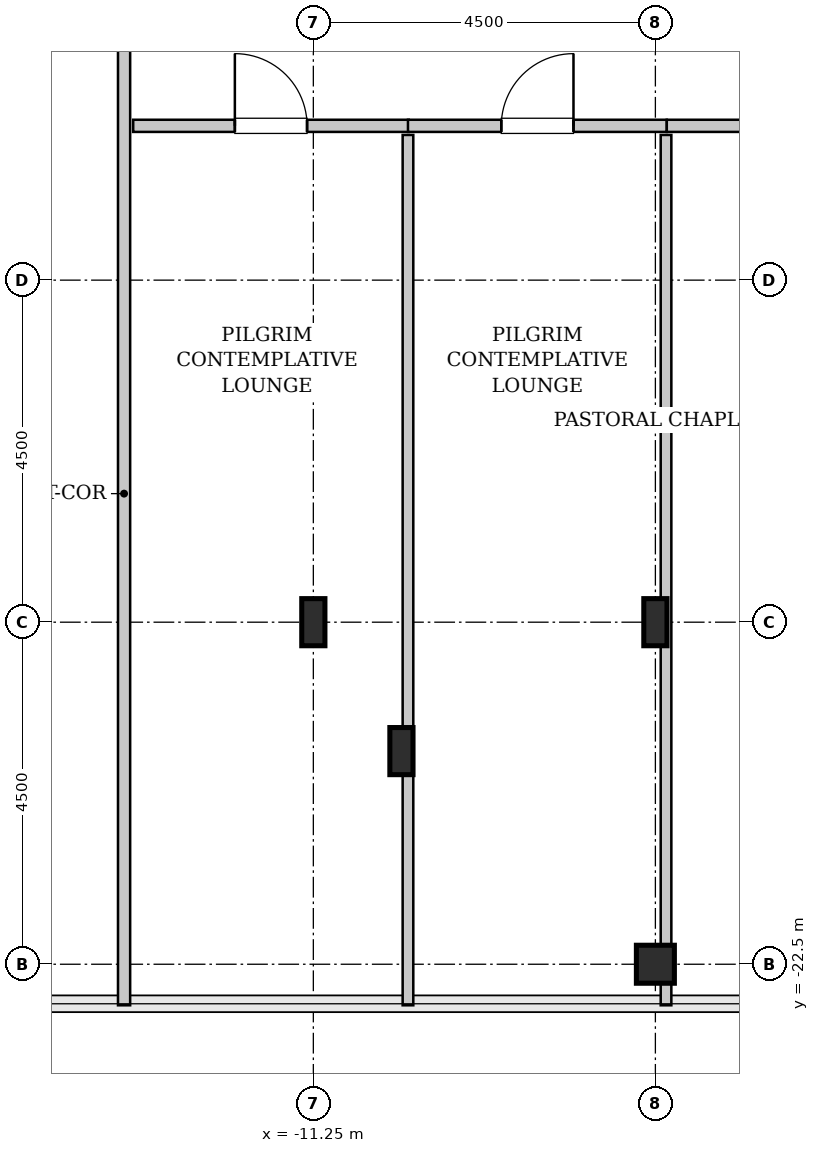
"""IFC4 building model, lengths in metres.
Left out: names, types, materials, properties, quantities, classifications, styles, units other than length and angle.
Written with IfcOpenShell. Run it as: python <this file> out.ifc"""

import sys

from ifc_helpers import new_model, si_unit, direction, frame, frame_2d, origin, origin_2d, place, context, subcontext, project, spatial, rectangle, hollow_rectangle, i_section, extrude, source, transform, mapped, element, fill, save


model = new_model("IFC4")
c1 = context("Model", 3, precision=1e-05, world=origin(), true_north=direction((0.0, 1.0)))
c2 = subcontext(c1, "Body", "Model", "MODEL_VIEW")
j1 = project(units=[si_unit("LENGTHUNIT", "METRE"), si_unit("PLANEANGLEUNIT", "RADIAN")], contexts=[c1])
p1 = place(None, origin())
s1 = spatial("IfcSite", under=j1, at=p1, CompositionType="ELEMENT")
p2 = place(p1, origin())
s2 = spatial("IfcBuilding", under=s1, at=p2, CompositionType="ELEMENT")
p3 = place(p2, frame((0.0, 0.0, 314.0)))
s3 = spatial("IfcBuildingStorey", under=s2, at=p3, CompositionType="ELEMENT", Elevation=314.0)
m1 = source(origin(), c2, "Body", "SweptSolid", [
    extrude(i_section(OverallWidth=0.305, OverallDepth=0.62, WebThickness=0.021, FlangeThickness=0.04, FilletRadius=0.027, at=origin_2d()), origin(), (0.0, 0.0, 1.0), 3.8),
])
for number, where, z_axis, x_axis in (
    (1, (-11.25, -18.0, 0.0), (0.0, 0.0, 1.0), (1.0, 0.0, 0.0)),
    (2, (-10.091, -19.696, 0.0), (0.0, 0.0, 1.0), (1.0, 0.0, 0.0)),
):
    element("IfcColumn", number, at=place(p3, frame(where, z_axis=z_axis, x_axis=x_axis)), inside=s3, PredefinedType="COLUMN", context=c2, shape_type="MappedRepresentation", body=[
        mapped(m1, transform((0.0, 0.0, 0.0), x_axis=(1.0, 0.0, 0.0), y_axis=(0.0, 1.0, 0.0), z_axis=(0.0, 0.0, 1.0), scale=1.0)),
    ])
m2 = source(origin(), c2, "Body", "SweptSolid", [
    extrude(hollow_rectangle(XDim=0.5, YDim=0.5, WallThickness=0.025, InnerFilletRadius=0.025, OuterFilletRadius=0.05, at=origin_2d()), origin(), (0.0, 0.0, 1.0), 3.8),
])
p4 = place(p3, frame((-6.75, -22.5, 0.0), z_axis=(0.0, 0.0, 1.0), x_axis=(1.0, 0.0, 0.0)))
e3 = element("IfcColumn", 3, at=p4, inside=s3, PredefinedType="COLUMN", context=c2, shape_type="MappedRepresentation", body=[
    mapped(m2, transform((0.0, 0.0, 0.0), x_axis=(1.0, 0.0, 0.0), y_axis=(0.0, 1.0, 0.0), z_axis=(0.0, 0.0, 1.0), scale=1.0)),
])
p5 = place(p3, frame((-6.75, -18.0, 0.0), z_axis=(0.0, 0.0, 1.0), x_axis=(1.0, 0.0, 0.0)))
e4 = element("IfcColumn", 4, at=p5, inside=s3, PredefinedType="COLUMN", context=c2, shape_type="MappedRepresentation", body=[
    mapped(m1, transform((0.0, 0.0, 0.0), x_axis=(1.0, 0.0, 0.0), y_axis=(0.0, 1.0, 0.0), z_axis=(0.0, 0.0, 1.0), scale=1.0)),
])
m3 = source(origin(), c2, "Body", "SweptSolid", [
    extrude(rectangle(XDim=16.245, YDim=0.16, at=frame_2d((8.123, 0.0))), origin(), (0.0, 0.0, 1.0), 3.485),
])
p6 = place(p3, frame((-13.74, -23.04, 0.0), z_axis=(0.0, 0.0, 1.0), x_axis=(0.0, 1.0, 0.0)))
e5 = element("IfcWall", 5, at=p6, inside=s3, PredefinedType="PARTITIONING", context=c2, shape_type="MappedRepresentation", body=[
    mapped(m3, transform((0.0, 0.0, 0.0), x_axis=(1.0, 0.0, 0.0), y_axis=(0.0, 1.0, 0.0), z_axis=(0.0, 0.0, 1.0), scale=1.0)),
])
p7 = place(p6, frame((13.413, 0.0, 0.0)))
e6 = element("IfcOpeningElement", 6, at=p7, cuts=e5, PredefinedType="OPENING", context=c2, shape_type="SweptSolid", body=[
    extrude(rectangle(XDim=0.95, YDim=2.1, at=frame_2d((0.475, 1.05))), frame((0.0, 0.09, 0.0), z_axis=(0.0, -1.0, 0.0), x_axis=(1.0, 0.0, 0.0)), (0.0, 0.0, 1.0), 0.18),
])
m4 = source(origin(), c2, "Body", "SweptSolid", [
    extrude(rectangle(XDim=3.625, YDim=0.16, at=frame_2d((1.812, 0.0))), origin(), (0.0, 0.0, 1.0), 3.485),
])
p8 = place(p3, frame((-13.62, -11.47, 0.0), z_axis=(0.0, 0.0, 1.0), x_axis=(1.0, 0.0, 0.0)))
e7 = element("IfcWall", 7, at=p8, inside=s3, PredefinedType="PARTITIONING", context=c2, shape_type="MappedRepresentation", body=[
    mapped(m4, transform((0.0, 0.0, 0.0), x_axis=(1.0, 0.0, 0.0), y_axis=(0.0, 1.0, 0.0), z_axis=(0.0, 0.0, 1.0), scale=1.0)),
])
p9 = place(p8, frame((1.337, 0.0, 0.0)))
e8 = element("IfcOpeningElement", 8, at=p9, cuts=e7, PredefinedType="OPENING", context=c2, shape_type="SweptSolid", body=[
    extrude(rectangle(XDim=0.95, YDim=2.1, at=frame_2d((0.475, 1.05))), frame((0.0, 0.09, 0.0), z_axis=(0.0, -1.0, 0.0), x_axis=(1.0, 0.0, 0.0)), (0.0, 0.0, 1.0), 0.18),
])
m5 = source(origin(), c2, "Body", "SweptSolid", [
    extrude(rectangle(XDim=11.45, YDim=0.14, at=frame_2d((5.725, 0.0))), origin(), (0.0, 0.0, 1.0), 3.485),
])
p10 = place(p3, frame((-10.005, -23.04, 0.0), z_axis=(0.0, 0.0, 1.0), x_axis=(0.0, 1.0, 0.0)))
e9 = element("IfcWall", 9, at=p10, inside=s3, PredefinedType="PARTITIONING", context=c2, shape_type="MappedRepresentation", body=[
    mapped(m5, transform((0.0, 0.0, 0.0), x_axis=(1.0, 0.0, 0.0), y_axis=(0.0, 1.0, 0.0), z_axis=(0.0, 0.0, 1.0), scale=1.0)),
])
m6 = source(origin(), c2, "Body", "SweptSolid", [
    extrude(rectangle(XDim=3.405, YDim=0.16, at=frame_2d((1.702, 0.0))), origin(), (0.0, 0.0, 1.0), 3.485),
])
p11 = place(p3, frame((-10.005, -11.47, 0.0), z_axis=(0.0, 0.0, 1.0), x_axis=(1.0, 0.0, 0.0)))
e10 = element("IfcWall", 10, at=p11, inside=s3, PredefinedType="PARTITIONING", context=c2, shape_type="MappedRepresentation", body=[
    mapped(m6, transform((0.0, 0.0, 0.0), x_axis=(1.0, 0.0, 0.0), y_axis=(0.0, 1.0, 0.0), z_axis=(0.0, 0.0, 1.0), scale=1.0)),
])
p12 = place(p11, frame((1.228, 0.0, 0.0)))
e11 = element("IfcOpeningElement", 11, at=p12, cuts=e10, PredefinedType="OPENING", context=c2, shape_type="SweptSolid", body=[
    extrude(rectangle(XDim=0.95, YDim=2.1, at=frame_2d((0.475, 1.05))), frame((0.0, 0.09, 0.0), z_axis=(0.0, -1.0, 0.0), x_axis=(1.0, 0.0, 0.0)), (0.0, 0.0, 1.0), 0.18),
])
m7 = source(origin(), c2, "Body", "SweptSolid", [
    extrude(rectangle(XDim=11.45, YDim=0.14, at=frame_2d((5.725, 0.0))), origin(), (0.0, 0.0, 1.0), 2.925),
])
p13 = place(p3, frame((-6.61, -23.04, 0.0), z_axis=(0.0, 0.0, 1.0), x_axis=(0.0, 1.0, 0.0)))
e12 = element("IfcWall", 12, at=p13, inside=s3, PredefinedType="PARTITIONING", context=c2, shape_type="MappedRepresentation", body=[
    mapped(m7, transform((0.0, 0.0, 0.0), x_axis=(1.0, 0.0, 0.0), y_axis=(0.0, 1.0, 0.0), z_axis=(0.0, 0.0, 1.0), scale=1.0)),
])
m8 = source(origin(), c2, "Body", "SweptSolid", [
    extrude(rectangle(XDim=3.405, YDim=0.16, at=frame_2d((1.703, 0.0))), origin(), (0.0, 0.0, 1.0), 3.485),
])
p14 = place(p3, frame((-6.6, -11.47, 0.0), z_axis=(0.0, 0.0, 1.0), x_axis=(1.0, 0.0, 0.0)))
e13 = element("IfcWall", 13, at=p14, inside=s3, PredefinedType="PARTITIONING", context=c2, shape_type="MappedRepresentation", body=[
    mapped(m8, transform((0.0, 0.0, 0.0), x_axis=(1.0, 0.0, 0.0), y_axis=(0.0, 1.0, 0.0), z_axis=(0.0, 0.0, 1.0), scale=1.0)),
])
p15 = place(p14, frame((1.228, 0.0, 0.0)))
e14 = element("IfcOpeningElement", 14, at=p15, cuts=e13, PredefinedType="OPENING", context=c2, shape_type="SweptSolid", body=[
    extrude(rectangle(XDim=0.95, YDim=2.1, at=frame_2d((0.475, 1.05))), frame((0.0, 0.09, 0.0), z_axis=(0.0, -1.0, 0.0), x_axis=(1.0, 0.0, 0.0)), (0.0, 0.0, 1.0), 0.18),
])
m9 = source(origin(), c2, "Body", "SweptSolid", [
    extrude(rectangle(XDim=0.95, YDim=2.1, at=frame_2d((0.475, 1.05))), frame((0.0, 0.025, 0.0), z_axis=(0.0, -1.0, 0.0), x_axis=(1.0, 0.0, 0.0)), (0.0, 0.0, 1.0), 0.05),
])
p16 = place(p9, origin())
e15 = element("IfcDoor", 15, at=p16, inside=s3, OperationType="SINGLE_SWING_LEFT", PredefinedType="DOOR", context=c2, shape_type="MappedRepresentation", body=[
    mapped(m9, transform((0.0, 0.0, 0.0), x_axis=(1.0, 0.0, 0.0), y_axis=(0.0, 1.0, 0.0), z_axis=(0.0, 0.0, 1.0), scale=1.0)),
])
fill(e8, e15)
p17 = place(p12, origin())
e16 = element("IfcDoor", 16, at=p17, inside=s3, OperationType="SINGLE_SWING_RIGHT", PredefinedType="DOOR", context=c2, shape_type="MappedRepresentation", body=[
    mapped(m9, transform((0.0, 0.0, 0.0), x_axis=(1.0, 0.0, 0.0), y_axis=(0.0, 1.0, 0.0), z_axis=(0.0, 0.0, 1.0), scale=1.0)),
])
fill(e11, e16)
save(model, sys.argv[1])
